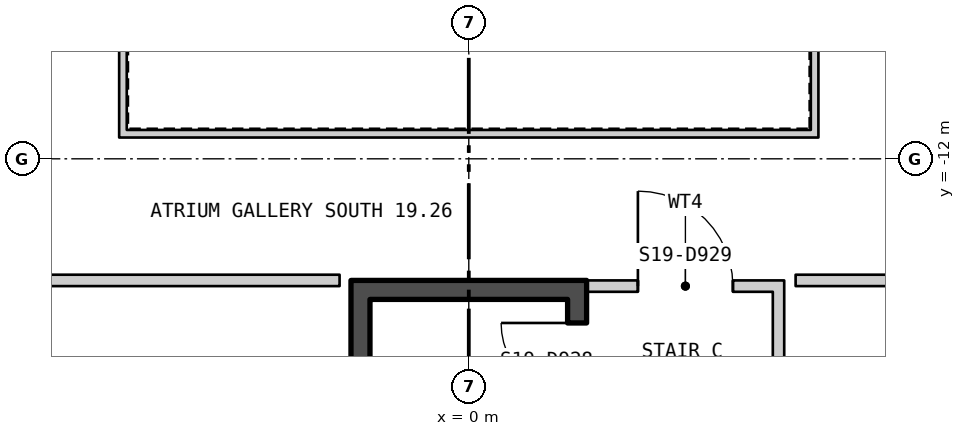
"""IFC4 building model, lengths in metres.
Left out: names, types, materials, properties, quantities, classifications, styles, units other than length and angle.
Written with IfcOpenShell. Run it as: python <this file> out.ifc"""

import sys

from ifc_helpers import new_model, si_unit, direction, frame, frame_2d, origin, place, context, subcontext, project, spatial, polyline, rectangle, outline, extrude, element, fill, save


model = new_model("IFC4")
c1 = context("Model", 3, precision=1e-05, world=origin(), true_north=direction((0.0, 1.0)))
c2 = subcontext(c1, "Body", "Model", "MODEL_VIEW")
j1 = project(units=[si_unit("LENGTHUNIT", "METRE"), si_unit("PLANEANGLEUNIT", "RADIAN")], contexts=[c1])
p1 = place(None, origin())
s1 = spatial("IfcSite", under=j1, at=p1, CompositionType="ELEMENT")
p2 = place(p1, origin())
s2 = spatial("IfcBuilding", under=s1, at=p2, CompositionType="ELEMENT")
p3 = place(p2, frame((0.0, 0.0, 257.1)))
s3 = spatial("IfcBuildingStorey", under=s2, at=p3, CompositionType="ELEMENT", Elevation=257.1)
p4 = place(p3, frame((-25.69, 15.082, -0.18), z_axis=(0.0, 0.0, 1.0), x_axis=(0.500000141277, -0.866025322218, 0.0)))
e1 = element("IfcWall", 1, at=p4, inside=s3, PredefinedType="SOLIDWALL", context=c2, shape_type="SweptSolid", body=[
    extrude(outline(polyline([(-0.13, -0.225), (45.86, -0.225), (45.6, 0.225), (0.13, 0.225), (-0.13, -0.225)])), origin(), (0.0, 0.0, 1.0), 3.68),
])
p5 = place(p4, frame((1.424, 0.0, 1.08)))
e2 = element("IfcOpeningElement", 2, at=p5, cuts=e1, PredefinedType="OPENING", context=c2, shape_type="SweptSolid", body=[
    extrude(rectangle(XDim=2.4, YDim=2.0, at=frame_2d((1.2, 1.0))), frame((0.0, 0.235, 0.0), z_axis=(0.0, -1.0, 0.0), x_axis=(1.0, 0.0, 0.0)), (0.0, 0.0, 1.0), 0.47),
])
p6 = place(p4, frame((5.892, 0.0, 1.08)))
e3 = element("IfcOpeningElement", 3, at=p6, cuts=e1, PredefinedType="OPENING", context=c2, shape_type="SweptSolid", body=[
    extrude(rectangle(XDim=2.4, YDim=2.0, at=frame_2d((1.2, 1.0))), frame((0.0, 0.235, 0.0), z_axis=(0.0, -1.0, 0.0), x_axis=(1.0, 0.0, 0.0)), (0.0, 0.0, 1.0), 0.47),
])
p7 = place(p4, frame((10.399, 0.0, 1.08)))
e4 = element("IfcOpeningElement", 4, at=p7, cuts=e1, PredefinedType="OPENING", context=c2, shape_type="SweptSolid", body=[
    extrude(rectangle(XDim=2.4, YDim=2.0, at=frame_2d((1.2, 1.0))), frame((0.0, 0.235, 0.0), z_axis=(0.0, -1.0, 0.0), x_axis=(1.0, 0.0, 0.0)), (0.0, 0.0, 1.0), 0.47),
])
p8 = place(p4, frame((14.905, 0.0, 1.08)))
e5 = element("IfcOpeningElement", 5, at=p8, cuts=e1, PredefinedType="OPENING", context=c2, shape_type="SweptSolid", body=[
    extrude(rectangle(XDim=2.4, YDim=2.0, at=frame_2d((1.2, 1.0))), frame((0.0, 0.235, 0.0), z_axis=(0.0, -1.0, 0.0), x_axis=(1.0, 0.0, 0.0)), (0.0, 0.0, 1.0), 0.47),
])
p9 = place(p4, frame((19.412, 0.0, 1.08)))
e6 = element("IfcOpeningElement", 6, at=p9, cuts=e1, PredefinedType="OPENING", context=c2, shape_type="SweptSolid", body=[
    extrude(rectangle(XDim=2.4, YDim=2.0, at=frame_2d((1.2, 1.0))), frame((0.0, 0.235, 0.0), z_axis=(0.0, -1.0, 0.0), x_axis=(1.0, 0.0, 0.0)), (0.0, 0.0, 1.0), 0.47),
])
p10 = place(p4, frame((23.918, 0.0, 1.08)))
e7 = element("IfcOpeningElement", 7, at=p10, cuts=e1, PredefinedType="OPENING", context=c2, shape_type="SweptSolid", body=[
    extrude(rectangle(XDim=2.4, YDim=2.0, at=frame_2d((1.2, 1.0))), frame((0.0, 0.235, 0.0), z_axis=(0.0, -1.0, 0.0), x_axis=(1.0, 0.0, 0.0)), (0.0, 0.0, 1.0), 0.47),
])
p11 = place(p4, frame((28.425, 0.0, 1.08)))
e8 = element("IfcOpeningElement", 8, at=p11, cuts=e1, PredefinedType="OPENING", context=c2, shape_type="SweptSolid", body=[
    extrude(rectangle(XDim=2.4, YDim=2.0, at=frame_2d((1.2, 1.0))), frame((0.0, 0.235, 0.0), z_axis=(0.0, -1.0, 0.0), x_axis=(1.0, 0.0, 0.0)), (0.0, 0.0, 1.0), 0.47),
])
p12 = place(p4, frame((32.932, 0.0, 1.08)))
e9 = element("IfcOpeningElement", 9, at=p12, cuts=e1, PredefinedType="OPENING", context=c2, shape_type="SweptSolid", body=[
    extrude(rectangle(XDim=2.4, YDim=2.0, at=frame_2d((1.2, 1.0))), frame((0.0, 0.235, 0.0), z_axis=(0.0, -1.0, 0.0), x_axis=(1.0, 0.0, 0.0)), (0.0, 0.0, 1.0), 0.47),
])
p13 = place(p4, frame((37.438, 0.0, 1.08)))
e10 = element("IfcOpeningElement", 10, at=p13, cuts=e1, PredefinedType="OPENING", context=c2, shape_type="SweptSolid", body=[
    extrude(rectangle(XDim=2.4, YDim=2.0, at=frame_2d((1.2, 1.0))), frame((0.0, 0.235, 0.0), z_axis=(0.0, -1.0, 0.0), x_axis=(1.0, 0.0, 0.0)), (0.0, 0.0, 1.0), 0.47),
])
p14 = place(p4, frame((41.907, 0.0, 1.08)))
e11 = element("IfcOpeningElement", 11, at=p14, cuts=e1, PredefinedType="OPENING", context=c2, shape_type="SweptSolid", body=[
    extrude(rectangle(XDim=2.4, YDim=2.0, at=frame_2d((1.2, 1.0))), frame((0.0, 0.235, 0.0), z_axis=(0.0, -1.0, 0.0), x_axis=(1.0, 0.0, 0.0)), (0.0, 0.0, 1.0), 0.47),
])
p15 = place(p3, frame((2.825, -24.522, -0.18), z_axis=(0.0, 0.0, 1.0), x_axis=(0.500000141277, 0.866025322218, 0.0)))
e12 = element("IfcWall", 12, at=p15, inside=s3, PredefinedType="SOLIDWALL", context=c2, shape_type="SweptSolid", body=[
    extrude(outline(polyline([(-0.13, -0.225), (45.86, -0.225), (45.6, 0.225), (0.13, 0.225), (-0.13, -0.225)])), origin(), (0.0, 0.0, 1.0), 3.68),
])
p16 = place(p15, frame((1.424, 0.0, 1.08)))
e13 = element("IfcOpeningElement", 13, at=p16, cuts=e12, PredefinedType="OPENING", context=c2, shape_type="SweptSolid", body=[
    extrude(rectangle(XDim=2.4, YDim=2.0, at=frame_2d((1.2, 1.0))), frame((0.0, 0.235, 0.0), z_axis=(0.0, -1.0, 0.0), x_axis=(1.0, 0.0, 0.0)), (0.0, 0.0, 1.0), 0.47),
])
p17 = place(p15, frame((5.892, 0.0, 1.08)))
e14 = element("IfcOpeningElement", 14, at=p17, cuts=e12, PredefinedType="OPENING", context=c2, shape_type="SweptSolid", body=[
    extrude(rectangle(XDim=2.4, YDim=2.0, at=frame_2d((1.2, 1.0))), frame((0.0, 0.235, 0.0), z_axis=(0.0, -1.0, 0.0), x_axis=(1.0, 0.0, 0.0)), (0.0, 0.0, 1.0), 0.47),
])
p18 = place(p15, frame((10.399, 0.0, 1.08)))
e15 = element("IfcOpeningElement", 15, at=p18, cuts=e12, PredefinedType="OPENING", context=c2, shape_type="SweptSolid", body=[
    extrude(rectangle(XDim=2.4, YDim=2.0, at=frame_2d((1.2, 1.0))), frame((0.0, 0.235, 0.0), z_axis=(0.0, -1.0, 0.0), x_axis=(1.0, 0.0, 0.0)), (0.0, 0.0, 1.0), 0.47),
])
p19 = place(p15, frame((14.905, 0.0, 1.08)))
e16 = element("IfcOpeningElement", 16, at=p19, cuts=e12, PredefinedType="OPENING", context=c2, shape_type="SweptSolid", body=[
    extrude(rectangle(XDim=2.4, YDim=2.0, at=frame_2d((1.2, 1.0))), frame((0.0, 0.235, 0.0), z_axis=(0.0, -1.0, 0.0), x_axis=(1.0, 0.0, 0.0)), (0.0, 0.0, 1.0), 0.47),
])
p20 = place(p15, frame((19.412, 0.0, 1.08)))
e17 = element("IfcOpeningElement", 17, at=p20, cuts=e12, PredefinedType="OPENING", context=c2, shape_type="SweptSolid", body=[
    extrude(rectangle(XDim=2.4, YDim=2.0, at=frame_2d((1.2, 1.0))), frame((0.0, 0.235, 0.0), z_axis=(0.0, -1.0, 0.0), x_axis=(1.0, 0.0, 0.0)), (0.0, 0.0, 1.0), 0.47),
])
p21 = place(p15, frame((28.425, 0.0, 1.08)))
e18 = element("IfcOpeningElement", 18, at=p21, cuts=e12, PredefinedType="OPENING", context=c2, shape_type="SweptSolid", body=[
    extrude(rectangle(XDim=2.4, YDim=2.0, at=frame_2d((1.2, 1.0))), frame((0.0, 0.235, 0.0), z_axis=(0.0, -1.0, 0.0), x_axis=(1.0, 0.0, 0.0)), (0.0, 0.0, 1.0), 0.47),
])
p22 = place(p15, frame((37.438, 0.0, 1.08)))
e19 = element("IfcOpeningElement", 19, at=p22, cuts=e12, PredefinedType="OPENING", context=c2, shape_type="SweptSolid", body=[
    extrude(rectangle(XDim=2.4, YDim=2.0, at=frame_2d((1.2, 1.0))), frame((0.0, 0.235, 0.0), z_axis=(0.0, -1.0, 0.0), x_axis=(1.0, 0.0, 0.0)), (0.0, 0.0, 1.0), 0.47),
])
p23 = place(p15, frame((41.907, 0.0, 1.08)))
e20 = element("IfcOpeningElement", 20, at=p23, cuts=e12, PredefinedType="OPENING", context=c2, shape_type="SweptSolid", body=[
    extrude(rectangle(XDim=2.4, YDim=2.0, at=frame_2d((1.2, 1.0))), frame((0.0, 0.235, 0.0), z_axis=(0.0, -1.0, 0.0), x_axis=(1.0, 0.0, 0.0)), (0.0, 0.0, 1.0), 0.47),
])
p24 = place(p3, frame((-4.6, -11.67, 0.0), z_axis=(0.0, 0.0, 1.0), x_axis=(1.0, 0.0, 0.0)))
e21 = element("IfcWall", 21, at=p24, inside=s3, PredefinedType="PARTITIONING", context=c2, shape_type="SweptSolid", body=[
    extrude(rectangle(XDim=9.2, YDim=0.1, at=frame_2d((4.6, 0.0))), origin(), (0.0, 0.0, 1.0), 3.7),
])
for number, where, z_axis, x_axis in (
    (22, (4.55, -11.62, 0.0), (0.0, 0.0, 1.0), (0.0, 1.0, 0.0)),
    (23, (-4.55, -3.58, 0.0), (0.0, 0.0, 1.0), (0.0, -1.0, 0.0)),
):
    element("IfcWall", number, at=place(p3, frame(where, z_axis=z_axis, x_axis=x_axis)), inside=s3, PredefinedType="PARTITIONING", context=c2, shape_type="SweptSolid", body=[
        extrude(rectangle(XDim=8.04, YDim=0.1, at=frame_2d((4.02, 0.0))), origin(), (0.0, 0.0, 1.0), 3.7),
    ])
p25 = place(p3, frame((-1.425, -21.05, 0.0), z_axis=(0.0, 0.0, 1.0), x_axis=(0.0, 1.0, 0.0)))
e24 = element("IfcWall", 24, at=p25, inside=s3, PredefinedType="SHEAR", context=c2, shape_type="SweptSolid", body=[
    extrude(rectangle(XDim=7.2, YDim=0.25, at=frame_2d((3.6, 0.0))), origin(), (0.0, 0.0, 1.0), 3.7),
])
p26 = place(p3, frame((1.425, -21.05, 0.0), z_axis=(0.0, 0.0, 1.0), x_axis=(0.0, 1.0, 0.0)))
e25 = element("IfcWall", 25, at=p26, inside=s3, PredefinedType="SHEAR", context=c2, shape_type="SweptSolid", body=[
    extrude(rectangle(XDim=7.2, YDim=0.25, at=frame_2d((3.6, 0.0))), origin(), (0.0, 0.0, 1.0), 3.7),
])
p27 = place(p26, frame((5.89, 0.0, 0.0)))
e26 = element("IfcOpeningElement", 26, at=p27, cuts=e25, PredefinedType="OPENING", context=c2, shape_type="SweptSolid", body=[
    extrude(rectangle(XDim=1.0, YDim=2.1, at=frame_2d((0.5, 1.05))), frame((0.0, 0.135, 0.0), z_axis=(0.0, -1.0, 0.0), x_axis=(1.0, 0.0, 0.0)), (0.0, 0.0, 1.0), 0.27),
])
p28 = place(p3, frame((-1.55, -13.725, 0.0), z_axis=(0.0, 0.0, 1.0), x_axis=(1.0, 0.0, 0.0)))
e27 = element("IfcWall", 27, at=p28, inside=s3, PredefinedType="SHEAR", context=c2, shape_type="SweptSolid", body=[
    extrude(rectangle(XDim=3.1, YDim=0.25, at=frame_2d((1.55, 0.0))), origin(), (0.0, 0.0, 1.0), 3.7),
])
p29 = place(p3, frame((4.075, -16.15, 0.0), z_axis=(0.0, 0.0, 1.0), x_axis=(0.0, 1.0, 0.0)))
e28 = element("IfcWall", 28, at=p29, inside=s3, PredefinedType="PARTITIONING", context=c2, shape_type="SweptSolid", body=[
    extrude(rectangle(XDim=2.4, YDim=0.15, at=frame_2d((1.2, 0.0))), origin(), (0.0, 0.0, 1.0), 3.7),
])
p30 = place(p3, frame((1.55, -13.675, 0.0), z_axis=(0.0, 0.0, 1.0), x_axis=(1.0, 0.0, 0.0)))
e29 = element("IfcWall", 29, at=p30, inside=s3, PredefinedType="PARTITIONING", context=c2, shape_type="SweptSolid", body=[
    extrude(rectangle(XDim=2.6, YDim=0.15, at=frame_2d((1.3, 0.0))), origin(), (0.0, 0.0, 1.0), 2.692),
])
p31 = place(p30, frame((0.675, 0.0, 0.0)))
e30 = element("IfcOpeningElement", 30, at=p31, cuts=e29, PredefinedType="OPENING", context=c2, shape_type="SweptSolid", body=[
    extrude(rectangle(XDim=1.25, YDim=2.1, at=frame_2d((0.625, 1.05))), frame((0.0, 0.085, 0.0), z_axis=(0.0, -1.0, 0.0), x_axis=(1.0, 0.0, 0.0)), (0.0, 0.0, 1.0), 0.17),
])
p32 = place(p3, frame((-7.805, -13.6, 0.0), z_axis=(0.0, 0.0, 1.0), x_axis=(1.0, 0.0, 0.0)))
e31 = element("IfcWall", 31, at=p32, inside=s3, PredefinedType="PARTITIONING", context=c2, shape_type="SweptSolid", body=[
    extrude(rectangle(XDim=6.105, YDim=0.15, at=frame_2d((3.053, 0.0))), origin(), (0.0, 0.0, 1.0), 2.692),
])
p33 = place(p32, frame((1.118, 0.0, 0.0)))
e32 = element("IfcOpeningElement", 32, at=p33, cuts=e31, PredefinedType="OPENING", context=c2, shape_type="SweptSolid", body=[
    extrude(rectangle(XDim=1.0, YDim=2.1, at=frame_2d((0.5, 1.05))), frame((0.0, 0.085, 0.0), z_axis=(0.0, -1.0, 0.0), x_axis=(1.0, 0.0, 0.0)), (0.0, 0.0, 1.0), 0.17),
])
p34 = place(p3, frame((4.3, -13.6, 0.0), z_axis=(0.0, 0.0, 1.0), x_axis=(1.0, 0.0, 0.0)))
e33 = element("IfcWall", 33, at=p34, inside=s3, PredefinedType="PARTITIONING", context=c2, shape_type="SweptSolid", body=[
    extrude(rectangle(XDim=3.505, YDim=0.15, at=frame_2d((1.752, 0.0))), origin(), (0.0, 0.0, 1.0), 2.692),
])
p35 = place(p34, frame((1.336, 0.0, 0.0)))
e34 = element("IfcOpeningElement", 34, at=p35, cuts=e33, PredefinedType="OPENING", context=c2, shape_type="SweptSolid", body=[
    extrude(rectangle(XDim=1.0, YDim=2.1, at=frame_2d((0.5, 1.05))), frame((0.0, 0.085, 0.0), z_axis=(0.0, -1.0, 0.0), x_axis=(1.0, 0.0, 0.0)), (0.0, 0.0, 1.0), 0.17),
])
p36 = place(p27, origin())
e35 = element("IfcDoor", 35, at=p36, inside=s3, OperationType="SINGLE_SWING_LEFT", PredefinedType="DOOR", context=c2, shape_type="SweptSolid", body=[
    extrude(rectangle(XDim=1.0, YDim=2.1, at=frame_2d((0.5, 1.05))), frame((0.0, 0.025, 0.0), z_axis=(0.0, -1.0, 0.0), x_axis=(1.0, 0.0, 0.0)), (0.0, 0.0, 1.0), 0.05),
])
fill(e26, e35)
p37 = place(p31, origin())
e36 = element("IfcDoor", 36, at=p37, inside=s3, OperationType="SINGLE_SWING_RIGHT", PredefinedType="DOOR", context=c2, shape_type="SweptSolid", body=[
    extrude(rectangle(XDim=1.25, YDim=2.1, at=frame_2d((0.625, 1.05))), frame((0.0, 0.025, 0.0), z_axis=(0.0, -1.0, 0.0), x_axis=(1.0, 0.0, 0.0)), (0.0, 0.0, 1.0), 0.05),
])
fill(e30, e36)
save(model, sys.argv[1])
